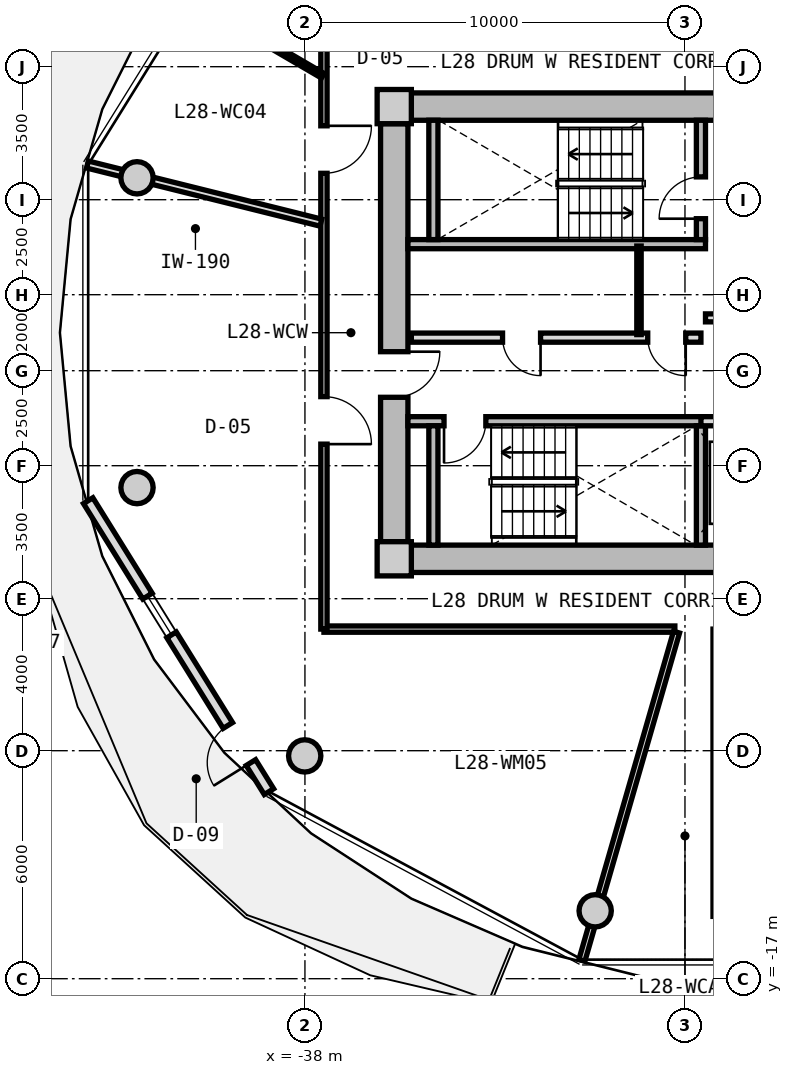
"""IFC4 building model, lengths in metres.
Left out: names, types, materials, properties, quantities, classifications, styles, units other than length and angle.
Written with IfcOpenShell. Run it as: python <this file> out.ifc"""

import sys

from ifc_helpers import new_model, si_unit, direction, frame, frame_2d, origin, origin_2d, place, context, subcontext, project, spatial, rectangle, circle, extrude, source, transform, mapped, element, fill, save


model = new_model("IFC4")
c1 = context("Model", 3, precision=1e-05, world=origin(), true_north=direction((0.0, 1.0)))
c2 = subcontext(c1, "Body", "Model", "MODEL_VIEW")
j1 = project(units=[si_unit("LENGTHUNIT", "METRE"), si_unit("PLANEANGLEUNIT", "RADIAN")], contexts=[c1])
p1 = place(None, origin())
s1 = spatial("IfcSite", under=j1, at=p1, CompositionType="ELEMENT")
p2 = place(p1, origin())
s2 = spatial("IfcBuilding", under=s1, at=p2, CompositionType="ELEMENT")
p3 = place(p2, frame((0.0, 0.0, 93.2)))
s3 = spatial("IfcBuildingStorey", under=s2, at=p3, CompositionType="ELEMENT", Elevation=93.2)
m1 = source(origin(), c2, "Body", "SweptSolid", [
    extrude(rectangle(XDim=0.9, YDim=0.9, at=origin_2d()), origin(), (0.0, 0.0, 1.0), 3.05),
])
for number, where, z_axis, x_axis in (
    (1, (-35.65, -5.95, 0.0), (0.0, 0.0, 1.0), (1.0, 0.0, 0.0)),
    (2, (-35.65, 5.95, 0.0), (0.0, 0.0, 1.0), (1.0, 0.0, 0.0)),
):
    element("IfcColumn", number, at=place(p3, frame(where, z_axis=z_axis, x_axis=x_axis)), inside=s3, PredefinedType="COLUMN", context=c2, shape_type="MappedRepresentation", body=[
        mapped(m1, transform((0.0, 0.0, 0.0), x_axis=(1.0, 0.0, 0.0), y_axis=(0.0, 1.0, 0.0), z_axis=(0.0, 0.0, 1.0), scale=1.0)),
    ])
m2 = source(origin(), c2, "Body", "SweptSolid", [
    extrude(rectangle(XDim=14.4, YDim=0.72, at=frame_2d((7.2, 0.0))), origin(), (0.0, 0.0, 1.0), 2.79),
])
for number, where, z_axis, x_axis in (
    (3, (-35.2, 5.95, 0.0), (0.0, 0.0, 1.0), (1.0, 0.0, 0.0)),
    (4, (-20.8, -5.95, 0.0), (0.0, 0.0, 1.0), (-1.0, 0.0, 0.0)),
):
    element("IfcWall", number, at=place(p3, frame(where, z_axis=z_axis, x_axis=x_axis)), inside=s3, PredefinedType="SHEAR", context=c2, shape_type="MappedRepresentation", body=[
        mapped(m2, transform((0.0, 0.0, 0.0), x_axis=(1.0, 0.0, 0.0), y_axis=(0.0, 1.0, 0.0), z_axis=(0.0, 0.0, 1.0), scale=1.0)),
    ])
m3 = source(origin(), c2, "Body", "SweptSolid", [
    extrude(rectangle(XDim=11.0, YDim=0.72, at=frame_2d((5.5, 0.0))), origin(), (0.0, 0.0, 1.0), 2.79),
])
p4 = place(p3, frame((-35.65, -5.5, 0.0), z_axis=(0.0, 0.0, 1.0), x_axis=(0.0, 1.0, 0.0)))
e5 = element("IfcWall", 5, at=p4, inside=s3, PredefinedType="SHEAR", context=c2, shape_type="MappedRepresentation", body=[
    mapped(m3, transform((0.0, 0.0, 0.0), x_axis=(1.0, 0.0, 0.0), y_axis=(0.0, 1.0, 0.0), z_axis=(0.0, 0.0, 1.0), scale=1.0)),
])
p5 = place(p4, frame((3.8, 0.0, 0.0)))
e6 = element("IfcOpeningElement", 6, at=p5, cuts=e5, PredefinedType="OPENING", context=c2, shape_type="SweptSolid", body=[
    extrude(rectangle(XDim=1.2, YDim=2.15, at=frame_2d((0.6, 1.075))), frame((0.0, 0.37, 0.0), z_axis=(0.0, -1.0, 0.0), x_axis=(1.0, 0.0, 0.0)), (0.0, 0.0, 1.0), 0.74),
])
m4 = source(origin(), c2, "Body", "SweptSolid", [
    extrude(circle(Radius=0.425, at=origin_2d()), origin(), (0.0, 0.0, 1.0), 3.05),
])
for number, where, z_axis, x_axis in (
    (7, (-42.419, 4.076, 0.0), (0.0, 0.0, 1.0), (1.0, 0.0, 0.0)),
    (8, (-42.419, -4.076, 0.0), (0.0, 0.0, 1.0), (1.0, 0.0, 0.0)),
    (9, (-38.006, -11.137, 0.0), (0.0, 0.0, 1.0), (1.0, 0.0, 0.0)),
    (10, (-30.363, -15.213, 0.0), (0.0, 0.0, 1.0), (1.0, 0.0, 0.0)),
):
    element("IfcColumn", number, at=place(p3, frame(where, z_axis=z_axis, x_axis=x_axis)), inside=s3, PredefinedType="COLUMN", context=c2, shape_type="MappedRepresentation", body=[
        mapped(m4, transform((0.0, 0.0, 0.0), x_axis=(1.0, 0.0, 0.0), y_axis=(0.0, 1.0, 0.0), z_axis=(0.0, 0.0, 1.0), scale=1.0)),
    ])
m5 = source(origin(), c2, "Body", "SweptSolid", [
    extrude(rectangle(XDim=9.014, YDim=0.29, at=frame_2d((4.507, 0.0))), origin(), (0.0, 0.0, 1.0), 2.79),
])
p6 = place(p3, frame((-38.947, -12.077, 0.0), z_axis=(0.0, 0.0, 1.0), x_axis=(-0.527732945084, 0.849410347637, 0.0)))
e11 = element("IfcWall", 11, at=p6, inside=s3, PredefinedType="SOLIDWALL", context=c2, shape_type="MappedRepresentation", body=[
    mapped(m5, transform((0.0, 0.0, 0.0), x_axis=(1.0, 0.0, 0.0), y_axis=(0.0, 1.0, 0.0), z_axis=(0.0, 0.0, 1.0), scale=1.0)),
])
p7 = place(p6, frame((0.9, 0.0, 0.0)))
e12 = element("IfcOpeningElement", 12, at=p7, cuts=e11, PredefinedType="OPENING", context=c2, shape_type="SweptSolid", body=[
    extrude(rectangle(XDim=1.15, YDim=2.25, at=frame_2d((0.575, 1.125))), frame((0.0, 0.155, 0.0), z_axis=(0.0, -1.0, 0.0), x_axis=(1.0, 0.0, 0.0)), (0.0, 0.0, 1.0), 0.31),
])
p8 = place(p6, frame((4.857, 0.0, 0.85)))
e13 = element("IfcOpeningElement", 13, at=p8, cuts=e11, PredefinedType="OPENING", context=c2, shape_type="SweptSolid", body=[
    extrude(rectangle(XDim=1.2, YDim=1.5, at=frame_2d((0.6, 0.75))), frame((0.0, 0.155, 0.0), z_axis=(0.0, -1.0, 0.0), x_axis=(1.0, 0.0, 0.0)), (0.0, 0.0, 1.0), 0.31),
])
m6 = source(origin(), c2, "Body", "SweptSolid", [
    extrude(rectangle(XDim=7.83, YDim=0.24, at=frame_2d((3.915, 0.0))), origin(), (0.0, 0.0, 1.0), 2.79),
])
p9 = place(p3, frame((-35.29, 2.33, 0.0), z_axis=(0.0, 0.0, 1.0), x_axis=(1.0, 0.0, 0.0)))
e14 = element("IfcWall", 14, at=p9, inside=s3, PredefinedType="PARTITIONING", context=c2, shape_type="MappedRepresentation", body=[
    mapped(m6, transform((0.0, 0.0, 0.0), x_axis=(1.0, 0.0, 0.0), y_axis=(0.0, 1.0, 0.0), z_axis=(0.0, 0.0, 1.0), scale=1.0)),
])
m7 = source(origin(), c2, "Body", "SweptSolid", [
    extrude(rectangle(XDim=3.14, YDim=0.24, at=frame_2d((1.57, 0.0))), origin(), (0.0, 0.0, 1.0), 2.79),
])
p10 = place(p3, frame((-34.62, 2.45, 0.0), z_axis=(0.0, 0.0, 1.0), x_axis=(0.0, 1.0, 0.0)))
e15 = element("IfcWall", 15, at=p10, inside=s3, PredefinedType="PARTITIONING", context=c2, shape_type="MappedRepresentation", body=[
    mapped(m7, transform((0.0, 0.0, 0.0), x_axis=(1.0, 0.0, 0.0), y_axis=(0.0, 1.0, 0.0), z_axis=(0.0, 0.0, 1.0), scale=1.0)),
])
p11 = place(p3, frame((-27.58, 2.45, 0.0), z_axis=(0.0, 0.0, 1.0), x_axis=(0.0, 1.0, 0.0)))
e16 = element("IfcWall", 16, at=p11, inside=s3, PredefinedType="PARTITIONING", context=c2, shape_type="MappedRepresentation", body=[
    mapped(m7, transform((0.0, 0.0, 0.0), x_axis=(1.0, 0.0, 0.0), y_axis=(0.0, 1.0, 0.0), z_axis=(0.0, 0.0, 1.0), scale=1.0)),
])
p12 = place(p11, frame((0.55, 0.0, 0.0)))
e17 = element("IfcOpeningElement", 17, at=p12, cuts=e16, PredefinedType="OPENING", context=c2, shape_type="SweptSolid", body=[
    extrude(rectangle(XDim=1.1, YDim=2.15, at=frame_2d((0.55, 1.075))), frame((0.0, 0.13, 0.0), z_axis=(0.0, -1.0, 0.0), x_axis=(1.0, 0.0, 0.0)), (0.0, 0.0, 1.0), 0.26),
])
p13 = place(p3, frame((-35.29, -2.33, 0.0), z_axis=(0.0, 0.0, 1.0), x_axis=(1.0, 0.0, 0.0)))
e18 = element("IfcWall", 18, at=p13, inside=s3, PredefinedType="PARTITIONING", context=c2, shape_type="MappedRepresentation", body=[
    mapped(m6, transform((0.0, 0.0, 0.0), x_axis=(1.0, 0.0, 0.0), y_axis=(0.0, 1.0, 0.0), z_axis=(0.0, 0.0, 1.0), scale=1.0)),
])
p14 = place(p13, frame((0.95, 0.0, 0.0)))
e19 = element("IfcOpeningElement", 19, at=p14, cuts=e18, PredefinedType="OPENING", context=c2, shape_type="SweptSolid", body=[
    extrude(rectangle(XDim=1.1, YDim=2.15, at=frame_2d((0.55, 1.075))), frame((0.0, 0.13, 0.0), z_axis=(0.0, -1.0, 0.0), x_axis=(1.0, 0.0, 0.0)), (0.0, 0.0, 1.0), 0.26),
])
for number, where, z_axis, x_axis in (
    (20, (-34.62, -5.59, 0.0), (0.0, 0.0, 1.0), (0.0, 1.0, 0.0)),
    (21, (-27.58, -5.59, 0.0), (0.0, 0.0, 1.0), (0.0, 1.0, 0.0)),
):
    element("IfcWall", number, at=place(p3, frame(where, z_axis=z_axis, x_axis=x_axis)), inside=s3, PredefinedType="PARTITIONING", context=c2, shape_type="MappedRepresentation", body=[
        mapped(m7, transform((0.0, 0.0, 0.0), x_axis=(1.0, 0.0, 0.0), y_axis=(0.0, 1.0, 0.0), z_axis=(0.0, 0.0, 1.0), scale=1.0)),
    ])
m8 = source(origin(), c2, "Body", "SweptSolid", [
    extrude(rectangle(XDim=6.66, YDim=0.21, at=frame_2d((3.33, 0.0))), origin(), (0.0, 0.0, 1.0), 2.775),
])
p15 = place(p3, frame((-27.46, 0.39, 0.0), z_axis=(0.0, 0.0, 1.0), x_axis=(1.0, 0.0, 0.0)))
e22 = element("IfcWall", 22, at=p15, inside=s3, PredefinedType="PARTITIONING", context=c2, shape_type="MappedRepresentation", body=[
    mapped(m8, transform((0.0, 0.0, 0.0), x_axis=(1.0, 0.0, 0.0), y_axis=(0.0, 1.0, 0.0), z_axis=(0.0, 0.0, 1.0), scale=1.0)),
])
p16 = place(p15, frame((1.0, 0.0, 0.0)))
e23 = element("IfcOpeningElement", 23, at=p16, cuts=e22, PredefinedType="OPENING", context=c2, shape_type="SweptSolid", body=[
    extrude(rectangle(XDim=1.2, YDim=2.15, at=frame_2d((0.6, 1.075))), frame((0.0, 0.115, 0.0), z_axis=(0.0, -1.0, 0.0), x_axis=(1.0, 0.0, 0.0)), (0.0, 0.0, 1.0), 0.23),
])
m9 = source(origin(), c2, "Body", "SweptSolid", [
    extrude(rectangle(XDim=7.62, YDim=0.24, at=frame_2d((3.81, 0.0))), origin(), (0.0, 0.0, 1.0), 2.775),
])
p17 = place(p3, frame((-35.2, -0.13, 0.0), z_axis=(0.0, 0.0, 1.0), x_axis=(1.0, 0.0, 0.0)))
e24 = element("IfcWall", 24, at=p17, inside=s3, PredefinedType="PARTITIONING", context=c2, shape_type="MappedRepresentation", body=[
    mapped(m9, transform((0.0, 0.0, 0.0), x_axis=(1.0, 0.0, 0.0), y_axis=(0.0, 1.0, 0.0), z_axis=(0.0, 0.0, 1.0), scale=1.0)),
])
p18 = place(p17, frame((6.22, 0.0, 0.0)))
e25 = element("IfcOpeningElement", 25, at=p18, cuts=e24, PredefinedType="OPENING", context=c2, shape_type="SweptSolid", body=[
    extrude(rectangle(XDim=1.0, YDim=2.1, at=frame_2d((0.5, 1.05))), frame((0.0, 0.13, 0.0), z_axis=(0.0, -1.0, 0.0), x_axis=(1.0, 0.0, 0.0)), (0.0, 0.0, 1.0), 0.26),
])
p19 = place(p17, frame((2.4, 0.0, 0.0)))
e26 = element("IfcOpeningElement", 26, at=p19, cuts=e24, PredefinedType="OPENING", context=c2, shape_type="SweptSolid", body=[
    extrude(rectangle(XDim=1.0, YDim=2.1, at=frame_2d((0.5, 1.05))), frame((0.0, 0.13, 0.0), z_axis=(0.0, -1.0, 0.0), x_axis=(1.0, 0.0, 0.0)), (0.0, 0.0, 1.0), 0.26),
])
m10 = source(origin(), c2, "Body", "SweptSolid", [
    extrude(rectangle(XDim=2.33, YDim=0.115, at=frame_2d((1.165, 0.0))), origin(), (0.0, 0.0, 1.0), 2.775),
])
p20 = place(p3, frame((-29.21, -0.05, 0.0), z_axis=(0.0, 0.0, 1.0), x_axis=(0.0, 1.0, 0.0)))
e27 = element("IfcWall", 27, at=p20, inside=s3, PredefinedType="PARTITIONING", context=c2, shape_type="MappedRepresentation", body=[
    mapped(m10, transform((0.0, 0.0, 0.0), x_axis=(1.0, 0.0, 0.0), y_axis=(0.0, 1.0, 0.0), z_axis=(0.0, 0.0, 1.0), scale=1.0)),
])
m11 = source(origin(), c2, "Body", "SweptSolid", [
    extrude(rectangle(XDim=4.13, YDim=0.24, at=frame_2d((2.065, 0.0))), origin(), (0.0, 0.0, 1.0), 2.775),
])
p21 = place(p3, frame((-27.58, -2.33, 0.0), z_axis=(0.0, 0.0, 1.0), x_axis=(1.0, 0.0, 0.0)))
e28 = element("IfcWall", 28, at=p21, inside=s3, PredefinedType="PARTITIONING", context=c2, shape_type="MappedRepresentation", body=[
    mapped(m11, transform((0.0, 0.0, 0.0), x_axis=(1.0, 0.0, 0.0), y_axis=(0.0, 1.0, 0.0), z_axis=(0.0, 0.0, 1.0), scale=1.0)),
])
p22 = place(p21, frame((0.5, 0.0, 0.0)))
e29 = element("IfcOpeningElement", 29, at=p22, cuts=e28, PredefinedType="OPENING", context=c2, shape_type="SweptSolid", body=[
    extrude(rectangle(XDim=1.1, YDim=2.2, at=frame_2d((0.55, 1.1))), frame((0.0, 0.13, 0.0), z_axis=(0.0, -1.0, 0.0), x_axis=(1.0, 0.0, 0.0)), (0.0, 0.0, 1.0), 0.26),
])
m12 = source(origin(), c2, "Body", "SweptSolid", [
    extrude(rectangle(XDim=9.234, YDim=0.165, at=frame_2d((4.617, 0.0))), origin(), (0.0, 0.0, 1.0), 2.775),
])
p23 = place(p3, frame((-28.266, -7.8, 0.0), z_axis=(0.0, 0.0, 1.0), x_axis=(-1.0, 0.0, 0.0)))
e30 = element("IfcWall", 30, at=p23, inside=s3, PredefinedType="PARTITIONING", context=c2, shape_type="MappedRepresentation", body=[
    mapped(m12, transform((0.0, 0.0, 0.0), x_axis=(1.0, 0.0, 0.0), y_axis=(0.0, 1.0, 0.0), z_axis=(0.0, 0.0, 1.0), scale=1.0)),
])
m13 = source(origin(), c2, "Body", "SweptSolid", [
    extrude(rectangle(XDim=15.6, YDim=0.165, at=frame_2d((7.8, 0.0))), origin(), (0.0, 0.0, 1.0), 2.775),
])
p24 = place(p3, frame((-37.5, -7.8, 0.0), z_axis=(0.0, 0.0, 1.0), x_axis=(0.0, 1.0, 0.0)))
e31 = element("IfcWall", 31, at=p24, inside=s3, PredefinedType="PARTITIONING", context=c2, shape_type="MappedRepresentation", body=[
    mapped(m13, transform((0.0, 0.0, 0.0), x_axis=(1.0, 0.0, 0.0), y_axis=(0.0, 1.0, 0.0), z_axis=(0.0, 0.0, 1.0), scale=1.0)),
])
p25 = place(p24, frame((11.994, 0.0, 0.0)))
e32 = element("IfcOpeningElement", 32, at=p25, cuts=e31, PredefinedType="OPENING", context=c2, shape_type="SweptSolid", body=[
    extrude(rectangle(XDim=1.25, YDim=2.2, at=frame_2d((0.625, 1.1))), frame((0.0, 0.093, 0.0), z_axis=(0.0, -1.0, 0.0), x_axis=(1.0, 0.0, 0.0)), (0.0, 0.0, 1.0), 0.185),
])
p26 = place(p24, frame((4.867, 0.0, 0.0)))
e33 = element("IfcOpeningElement", 33, at=p26, cuts=e31, PredefinedType="OPENING", context=c2, shape_type="SweptSolid", body=[
    extrude(rectangle(XDim=1.25, YDim=2.2, at=frame_2d((0.625, 1.1))), frame((0.0, 0.093, 0.0), z_axis=(0.0, -1.0, 0.0), x_axis=(1.0, 0.0, 0.0)), (0.0, 0.0, 1.0), 0.185),
])
m14 = source(origin(), c2, "Body", "SweptSolid", [
    extrude(rectangle(XDim=8.989, YDim=0.165, at=frame_2d((4.495, 0.0))), origin(), (0.0, 0.0, 1.0), 2.275),
])
p27 = place(p3, frame((-28.222, -7.88, 0.0), z_axis=(0.0, 0.0, 1.0), x_axis=(-0.27702323008, -0.960863221274, 0.0)))
e34 = element("IfcWall", 34, at=p27, inside=s3, PredefinedType="PARTITIONING", context=c2, shape_type="MappedRepresentation", body=[
    mapped(m14, transform((0.0, 0.0, 0.0), x_axis=(1.0, 0.0, 0.0), y_axis=(0.0, 1.0, 0.0), z_axis=(0.0, 0.0, 1.0), scale=1.0)),
])
m15 = source(origin(), c2, "Body", "SweptSolid", [
    extrude(rectangle(XDim=6.331, YDim=0.19, at=frame_2d((3.165, 0.0))), origin(), (0.0, 0.0, 1.0), 2.275),
])
p28 = place(p3, frame((-37.58, 2.896, 0.0), z_axis=(0.0, 0.0, 1.0), x_axis=(-0.97036440661, 0.241646267062, 0.0)))
e35 = element("IfcWall", 35, at=p28, inside=s3, PredefinedType="PARTITIONING", context=c2, shape_type="MappedRepresentation", body=[
    mapped(m15, transform((0.0, 0.0, 0.0), x_axis=(1.0, 0.0, 0.0), y_axis=(0.0, 1.0, 0.0), z_axis=(0.0, 0.0, 1.0), scale=1.0)),
])
m16 = source(origin(), c2, "Body", "SweptSolid", [
    extrude(rectangle(XDim=2.172, YDim=0.14, at=frame_2d((1.086, 0.0))), origin(), (0.0, 0.0, 1.0), 2.775),
])
p29 = place(p3, frame((-37.53, 6.762, 0.0), z_axis=(0.0, 0.0, 1.0), x_axis=(-0.863562702562, 0.504241468688, 0.0)))
e36 = element("IfcWall", 36, at=p29, inside=s3, PredefinedType="PARTITIONING", context=c2, shape_type="MappedRepresentation", body=[
    mapped(m16, transform((0.0, 0.0, 0.0), x_axis=(1.0, 0.0, 0.0), y_axis=(0.0, 1.0, 0.0), z_axis=(0.0, 0.0, 1.0), scale=1.0)),
])
m17 = source(origin(), c2, "Body", "SweptSolid", [
    extrude(rectangle(XDim=1.15, YDim=2.25, at=frame_2d((0.575, 1.125))), frame((0.0, 0.025, 0.0), z_axis=(0.0, -1.0, 0.0), x_axis=(1.0, 0.0, 0.0)), (0.0, 0.0, 1.0), 0.05),
])
p30 = place(p7, origin())
e37 = element("IfcDoor", 37, at=p30, inside=s3, OperationType="SINGLE_SWING_LEFT", PredefinedType="DOOR", context=c2, shape_type="MappedRepresentation", body=[
    mapped(m17, transform((0.0, 0.0, 0.0), x_axis=(1.0, 0.0, 0.0), y_axis=(0.0, 1.0, 0.0), z_axis=(0.0, 0.0, 1.0), scale=1.0)),
])
fill(e12, e37)
m18 = source(origin(), c2, "Body", "SweptSolid", [
    extrude(rectangle(XDim=1.2, YDim=1.5, at=frame_2d((0.6, 0.75))), frame((0.0, 0.03, 0.0), z_axis=(0.0, -1.0, 0.0), x_axis=(1.0, 0.0, 0.0)), (0.0, 0.0, 1.0), 0.06),
])
p31 = place(p8, origin())
e38 = element("IfcWindow", 38, at=p31, inside=s3, PartitioningType="SINGLE_PANEL", PredefinedType="WINDOW", context=c2, shape_type="MappedRepresentation", body=[
    mapped(m18, transform((0.0, 0.0, 0.0), x_axis=(1.0, 0.0, 0.0), y_axis=(0.0, 1.0, 0.0), z_axis=(0.0, 0.0, 1.0), scale=1.0)),
])
fill(e13, e38)
m19 = source(origin(), c2, "Body", "SweptSolid", [
    extrude(rectangle(XDim=1.1, YDim=2.15, at=frame_2d((0.55, 1.075))), frame((0.0, 0.025, 0.0), z_axis=(0.0, -1.0, 0.0), x_axis=(1.0, 0.0, 0.0)), (0.0, 0.0, 1.0), 0.05),
])
p32 = place(p12, origin())
e39 = element("IfcDoor", 39, at=p32, inside=s3, OperationType="SINGLE_SWING_LEFT", PredefinedType="DOOR", context=c2, shape_type="MappedRepresentation", body=[
    mapped(m19, transform((0.0, 0.0, 0.0), x_axis=(1.0, 0.0, 0.0), y_axis=(0.0, 1.0, 0.0), z_axis=(0.0, 0.0, 1.0), scale=1.0)),
])
fill(e17, e39)
p33 = place(p14, frame((1.1, 0.0, 0.0), z_axis=(0.0, 0.0, 1.0), x_axis=(-1.0, 0.0, 0.0)))
e40 = element("IfcDoor", 40, at=p33, inside=s3, OperationType="SINGLE_SWING_RIGHT", PredefinedType="DOOR", context=c2, shape_type="MappedRepresentation", body=[
    mapped(m19, transform((0.0, 0.0, 0.0), x_axis=(1.0, 0.0, 0.0), y_axis=(0.0, 1.0, 0.0), z_axis=(0.0, 0.0, 1.0), scale=1.0)),
])
fill(e19, e40)
m20 = source(origin(), c2, "Body", "SweptSolid", [
    extrude(rectangle(XDim=1.2, YDim=2.15, at=frame_2d((0.6, 1.075))), frame((0.0, 0.025, 0.0), z_axis=(0.0, -1.0, 0.0), x_axis=(1.0, 0.0, 0.0)), (0.0, 0.0, 1.0), 0.05),
])
p34 = place(p5, frame((1.2, 0.0, 0.0), z_axis=(0.0, 0.0, 1.0), x_axis=(-1.0, 0.0, 0.0)))
e41 = element("IfcDoor", 41, at=p34, inside=s3, OperationType="SINGLE_SWING_LEFT", PredefinedType="DOOR", context=c2, shape_type="MappedRepresentation", body=[
    mapped(m20, transform((0.0, 0.0, 0.0), x_axis=(1.0, 0.0, 0.0), y_axis=(0.0, 1.0, 0.0), z_axis=(0.0, 0.0, 1.0), scale=1.0)),
])
fill(e6, e41)
m21 = source(origin(), c2, "Body", "SweptSolid", [
    extrude(rectangle(XDim=1.0, YDim=2.1, at=frame_2d((0.5, 1.05))), frame((0.0, 0.025, 0.0), z_axis=(0.0, -1.0, 0.0), x_axis=(1.0, 0.0, 0.0)), (0.0, 0.0, 1.0), 0.05),
])
p35 = place(p18, frame((1.0, 0.0, 0.0), z_axis=(0.0, 0.0, 1.0), x_axis=(-1.0, 0.0, 0.0)))
e42 = element("IfcDoor", 42, at=p35, inside=s3, OperationType="SINGLE_SWING_LEFT", PredefinedType="DOOR", context=c2, shape_type="MappedRepresentation", body=[
    mapped(m21, transform((0.0, 0.0, 0.0), x_axis=(1.0, 0.0, 0.0), y_axis=(0.0, 1.0, 0.0), z_axis=(0.0, 0.0, 1.0), scale=1.0)),
])
fill(e25, e42)
p36 = place(p19, frame((1.0, 0.0, 0.0), z_axis=(0.0, 0.0, 1.0), x_axis=(-1.0, 0.0, 0.0)))
e43 = element("IfcDoor", 43, at=p36, inside=s3, OperationType="SINGLE_SWING_LEFT", PredefinedType="DOOR", context=c2, shape_type="MappedRepresentation", body=[
    mapped(m21, transform((0.0, 0.0, 0.0), x_axis=(1.0, 0.0, 0.0), y_axis=(0.0, 1.0, 0.0), z_axis=(0.0, 0.0, 1.0), scale=1.0)),
])
fill(e26, e43)
m22 = source(origin(), c2, "Body", "SweptSolid", [
    extrude(rectangle(XDim=1.25, YDim=2.2, at=frame_2d((0.625, 1.1))), frame((0.0, 0.025, 0.0), z_axis=(0.0, -1.0, 0.0), x_axis=(1.0, 0.0, 0.0)), (0.0, 0.0, 1.0), 0.05),
])
p37 = place(p25, frame((1.25, 0.0, 0.0), z_axis=(0.0, 0.0, 1.0), x_axis=(-1.0, 0.0, 0.0)))
e44 = element("IfcDoor", 44, at=p37, inside=s3, OperationType="SINGLE_SWING_LEFT", PredefinedType="DOOR", context=c2, shape_type="MappedRepresentation", body=[
    mapped(m22, transform((0.0, 0.0, 0.0), x_axis=(1.0, 0.0, 0.0), y_axis=(0.0, 1.0, 0.0), z_axis=(0.0, 0.0, 1.0), scale=1.0)),
])
fill(e32, e44)
p38 = place(p26, frame((1.25, 0.0, 0.0), z_axis=(0.0, 0.0, 1.0), x_axis=(-1.0, 0.0, 0.0)))
e45 = element("IfcDoor", 45, at=p38, inside=s3, OperationType="SINGLE_SWING_RIGHT", PredefinedType="DOOR", context=c2, shape_type="MappedRepresentation", body=[
    mapped(m22, transform((0.0, 0.0, 0.0), x_axis=(1.0, 0.0, 0.0), y_axis=(0.0, 1.0, 0.0), z_axis=(0.0, 0.0, 1.0), scale=1.0)),
])
fill(e33, e45)
save(model, sys.argv[1])
